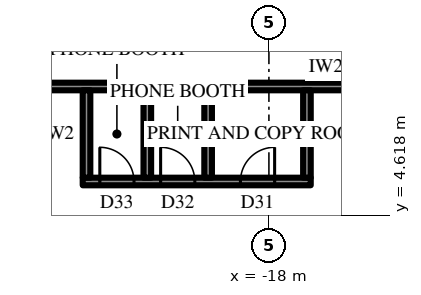
"""IFC4 building model, lengths in metres.
Left out: names, types, materials, properties, quantities, classifications, styles, units other than length and angle.
Written with IfcOpenShell. Run it as: python <this file> out.ifc"""

import sys

from ifc_helpers import new_model, si_unit, direction, frame, frame_2d, origin, place, context, subcontext, project, spatial, rectangle, extrude, element, fill, save


model = new_model("IFC4")
c1 = context("Model", 3, precision=1e-05, world=origin(), true_north=direction((0.0, 1.0)))
c2 = subcontext(c1, "Body", "Model", "MODEL_VIEW")
j1 = project(units=[si_unit("LENGTHUNIT", "METRE"), si_unit("PLANEANGLEUNIT", "RADIAN")], contexts=[c1])
p1 = place(None, origin())
s1 = spatial("IfcSite", under=j1, at=p1, CompositionType="ELEMENT")
p2 = place(p1, origin())
s2 = spatial("IfcBuilding", under=s1, at=p2, CompositionType="ELEMENT")
p3 = place(p2, frame((0.0, 0.0, 378.7)))
s3 = spatial("IfcBuildingStorey", under=s2, at=p3, CompositionType="ELEMENT", Elevation=378.7)
p4 = place(p3, frame((-12.425, 8.0, 0.0), z_axis=(0.0, 0.0, 1.0), x_axis=(-1.0, 0.0, 0.0)))
e1 = element("IfcWall", 1, at=p4, inside=s3, PredefinedType="PARTITIONING", context=c2, shape_type="SweptSolid", body=[
    extrude(rectangle(XDim=13.59, YDim=0.2, at=frame_2d((6.795, 0.0))), origin(), (0.0, 0.0, 1.0), 4.0),
])
p5 = place(p4, frame((0.859, 0.0, 0.0)))
e2 = element("IfcOpeningElement", 2, at=p5, cuts=e1, PredefinedType="OPENING", context=c2, shape_type="SweptSolid", body=[
    extrude(rectangle(XDim=1.0, YDim=2.2, at=frame_2d((0.5, 1.1))), frame((0.0, 0.11, 0.0), z_axis=(0.0, -1.0, 0.0), x_axis=(1.0, 0.0, 0.0)), (0.0, 0.0, 1.0), 0.22),
])
p6 = place(p3, frame((-16.9, 5.5, 0.0), z_axis=(0.0, 0.0, 1.0), x_axis=(-1.0, 0.0, 0.0)))
e3 = element("IfcWall", 3, at=p6, inside=s3, PredefinedType="PARTITIONING", context=c2, shape_type="SweptSolid", body=[
    extrude(rectangle(XDim=6.0, YDim=0.2, at=frame_2d((3.0, 0.0))), origin(), (0.0, 0.0, 1.0), 4.0),
])
p7 = place(p6, frame((0.95, 0.0, 0.0)))
e4 = element("IfcOpeningElement", 4, at=p7, cuts=e3, PredefinedType="OPENING", context=c2, shape_type="SweptSolid", body=[
    extrude(rectangle(XDim=0.9, YDim=2.2, at=frame_2d((0.45, 1.1))), frame((0.0, 0.11, 0.0), z_axis=(0.0, -1.0, 0.0), x_axis=(1.0, 0.0, 0.0)), (0.0, 0.0, 1.0), 0.22),
])
p8 = place(p6, frame((3.05, 0.0, 0.0)))
e5 = element("IfcOpeningElement", 5, at=p8, cuts=e3, PredefinedType="OPENING", context=c2, shape_type="SweptSolid", body=[
    extrude(rectangle(XDim=0.9, YDim=2.2, at=frame_2d((0.45, 1.1))), frame((0.0, 0.11, 0.0), z_axis=(0.0, -1.0, 0.0), x_axis=(1.0, 0.0, 0.0)), (0.0, 0.0, 1.0), 0.22),
])
p9 = place(p6, frame((4.65, 0.0, 0.0)))
e6 = element("IfcOpeningElement", 6, at=p9, cuts=e3, PredefinedType="OPENING", context=c2, shape_type="SweptSolid", body=[
    extrude(rectangle(XDim=0.9, YDim=2.2, at=frame_2d((0.45, 1.1))), frame((0.0, 0.11, 0.0), z_axis=(0.0, -1.0, 0.0), x_axis=(1.0, 0.0, 0.0)), (0.0, 0.0, 1.0), 0.22),
])
for number, where, z_axis, x_axis in (
    (7, (-17.0, 7.9, 0.0), (0.0, 0.0, 1.0), (0.0, -1.0, 0.0)),
    (8, (-19.6, 7.9, 0.0), (0.0, 0.0, 1.0), (0.0, -1.0, 0.0)),
    (9, (-21.2, 7.9, 0.0), (0.0, 0.0, 1.0), (0.0, -1.0, 0.0)),
    (10, (-22.8, 7.9, 0.0), (0.0, 0.0, 1.0), (0.0, -1.0, 0.0)),
):
    element("IfcWall", number, at=place(p3, frame(where, z_axis=z_axis, x_axis=x_axis)), inside=s3, PredefinedType="PARTITIONING", context=c2, shape_type="SweptSolid", body=[
        extrude(rectangle(XDim=2.3, YDim=0.2, at=frame_2d((1.15, 0.0))), origin(), (0.0, 0.0, 1.0), 4.0),
    ])
p10 = place(p7, frame((0.9, 0.0, 0.0), z_axis=(0.0, 0.0, 1.0), x_axis=(-1.0, 0.0, 0.0)))
e11 = element("IfcDoor", 11, at=p10, inside=s3, OperationType="SINGLE_SWING_LEFT", PredefinedType="DOOR", context=c2, shape_type="SweptSolid", body=[
    extrude(rectangle(XDim=0.9, YDim=2.2, at=frame_2d((0.45, 1.1))), frame((0.0, 0.025, 0.0), z_axis=(0.0, -1.0, 0.0), x_axis=(1.0, 0.0, 0.0)), (0.0, 0.0, 1.0), 0.05),
])
fill(e4, e11)
p11 = place(p8, frame((0.9, 0.0, 0.0), z_axis=(0.0, 0.0, 1.0), x_axis=(-1.0, 0.0, 0.0)))
e12 = element("IfcDoor", 12, at=p11, inside=s3, OperationType="SINGLE_SWING_RIGHT", PredefinedType="DOOR", context=c2, shape_type="SweptSolid", body=[
    extrude(rectangle(XDim=0.9, YDim=2.2, at=frame_2d((0.45, 1.1))), frame((0.0, 0.025, 0.0), z_axis=(0.0, -1.0, 0.0), x_axis=(1.0, 0.0, 0.0)), (0.0, 0.0, 1.0), 0.05),
])
fill(e5, e12)
p12 = place(p9, frame((0.9, 0.0, 0.0), z_axis=(0.0, 0.0, 1.0), x_axis=(-1.0, 0.0, 0.0)))
e13 = element("IfcDoor", 13, at=p12, inside=s3, OperationType="SINGLE_SWING_RIGHT", PredefinedType="DOOR", context=c2, shape_type="SweptSolid", body=[
    extrude(rectangle(XDim=0.9, YDim=2.2, at=frame_2d((0.45, 1.1))), frame((0.0, 0.025, 0.0), z_axis=(0.0, -1.0, 0.0), x_axis=(1.0, 0.0, 0.0)), (0.0, 0.0, 1.0), 0.05),
])
fill(e6, e13)
save(model, sys.argv[1])
